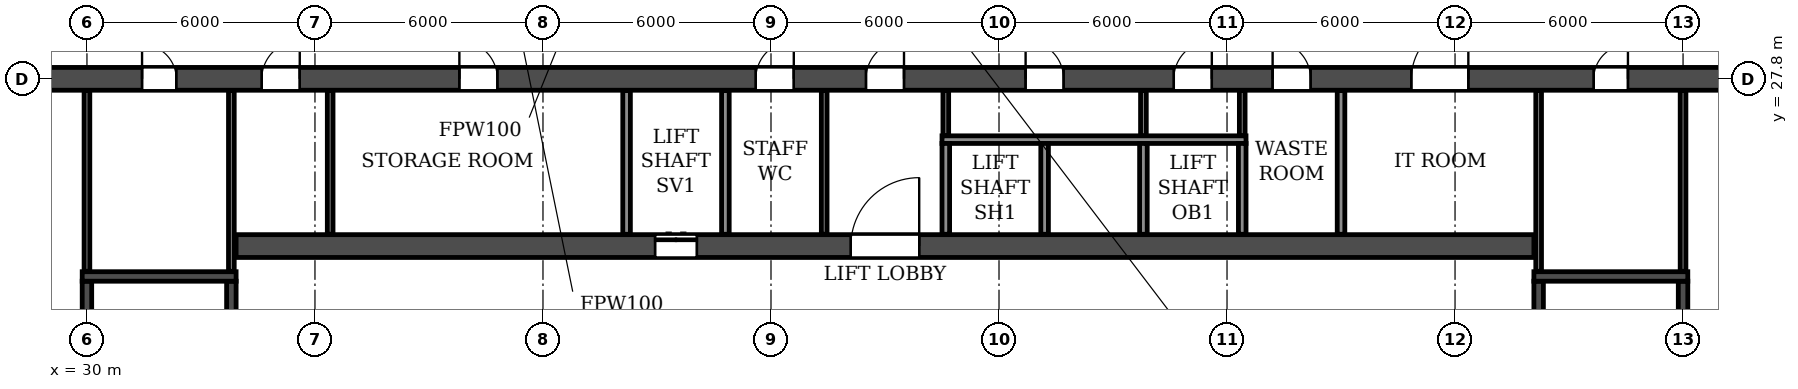
"""IFC4 building model, lengths in metres.
Left out: names, types, materials, properties, quantities, classifications, styles, units other than length and angle.
Written with IfcOpenShell. Run it as: python <this file> out.ifc"""

import sys

from ifc_helpers import new_model, si_unit, direction, frame, frame_2d, origin, place, context, subcontext, project, spatial, rectangle, extrude, element, fill, save


model = new_model("IFC4")
c1 = context("Model", 3, precision=1e-05, world=origin(), true_north=direction((0.0, 1.0)))
c2 = subcontext(c1, "Body", "Model", "MODEL_VIEW")
j1 = project(units=[si_unit("LENGTHUNIT", "METRE"), si_unit("PLANEANGLEUNIT", "RADIAN")], contexts=[c1])
p1 = place(None, origin())
s1 = spatial("IfcSite", under=j1, at=p1, CompositionType="ELEMENT")
p2 = place(p1, origin())
s2 = spatial("IfcBuilding", under=s1, at=p2, CompositionType="ELEMENT")
p3 = place(p2, frame((0.0, 0.0, 26.7)))
s3 = spatial("IfcBuildingStorey", under=s2, at=p3, CompositionType="ELEMENT", Elevation=26.7)
p4 = place(p3, frame((2.6, 27.8, 0.0), z_axis=(0.0, 0.0, 1.0), x_axis=(1.0, 0.0, 0.0)))
e1 = element("IfcWall", 1, at=p4, inside=s3, PredefinedType="SOLIDWALL", context=c2, shape_type="SweptSolid", body=[
    extrude(rectangle(XDim=96.8, YDim=0.6, at=frame_2d((48.4, 0.0))), origin(), (0.0, 0.0, 1.0), 3.05),
])
p5 = place(p4, frame((1.8, 0.0, 0.0)))
e2 = element("IfcOpeningElement", 2, at=p5, cuts=e1, PredefinedType="OPENING", context=c2, shape_type="SweptSolid", body=[
    extrude(rectangle(XDim=1.0, YDim=2.1, at=frame_2d((0.5, 1.05))), frame((0.0, 0.31, 0.0), z_axis=(0.0, -1.0, 0.0), x_axis=(1.0, 0.0, 0.0)), (0.0, 0.0, 1.0), 0.62),
])
p6 = place(p4, frame((9.5, 0.0, 0.0)))
e3 = element("IfcOpeningElement", 3, at=p6, cuts=e1, PredefinedType="OPENING", context=c2, shape_type="SweptSolid", body=[
    extrude(rectangle(XDim=1.0, YDim=2.1, at=frame_2d((0.5, 1.05))), frame((0.0, 0.31, 0.0), z_axis=(0.0, -1.0, 0.0), x_axis=(1.0, 0.0, 0.0)), (0.0, 0.0, 1.0), 0.62),
])
p7 = place(p4, frame((16.3, 0.0, 0.0)))
e4 = element("IfcOpeningElement", 4, at=p7, cuts=e1, PredefinedType="OPENING", context=c2, shape_type="SweptSolid", body=[
    extrude(rectangle(XDim=1.0, YDim=2.1, at=frame_2d((0.5, 1.05))), frame((0.0, 0.31, 0.0), z_axis=(0.0, -1.0, 0.0), x_axis=(1.0, 0.0, 0.0)), (0.0, 0.0, 1.0), 0.62),
])
p8 = place(p4, frame((19.65, 0.0, 0.0)))
e5 = element("IfcOpeningElement", 5, at=p8, cuts=e1, PredefinedType="OPENING", context=c2, shape_type="SweptSolid", body=[
    extrude(rectangle(XDim=0.9, YDim=2.1, at=frame_2d((0.45, 1.05))), frame((0.0, 0.31, 0.0), z_axis=(0.0, -1.0, 0.0), x_axis=(1.0, 0.0, 0.0)), (0.0, 0.0, 1.0), 0.62),
])
p9 = place(p4, frame((28.85, 0.0, 0.0)))
e6 = element("IfcOpeningElement", 6, at=p9, cuts=e1, PredefinedType="OPENING", context=c2, shape_type="SweptSolid", body=[
    extrude(rectangle(XDim=0.9, YDim=2.1, at=frame_2d((0.45, 1.05))), frame((0.0, 0.31, 0.0), z_axis=(0.0, -1.0, 0.0), x_axis=(1.0, 0.0, 0.0)), (0.0, 0.0, 1.0), 0.62),
])
p10 = place(p4, frame((32.0, 0.0, 0.0)))
e7 = element("IfcOpeningElement", 7, at=p10, cuts=e1, PredefinedType="OPENING", context=c2, shape_type="SweptSolid", body=[
    extrude(rectangle(XDim=1.0, YDim=2.1, at=frame_2d((0.5, 1.05))), frame((0.0, 0.31, 0.0), z_axis=(0.0, -1.0, 0.0), x_axis=(1.0, 0.0, 0.0)), (0.0, 0.0, 1.0), 0.62),
])
p11 = place(p4, frame((37.2, 0.0, 0.0)))
e8 = element("IfcOpeningElement", 8, at=p11, cuts=e1, PredefinedType="OPENING", context=c2, shape_type="SweptSolid", body=[
    extrude(rectangle(XDim=1.0, YDim=2.1, at=frame_2d((0.5, 1.05))), frame((0.0, 0.31, 0.0), z_axis=(0.0, -1.0, 0.0), x_axis=(1.0, 0.0, 0.0)), (0.0, 0.0, 1.0), 0.62),
])
p12 = place(p4, frame((45.0, 0.0, 0.0)))
e9 = element("IfcOpeningElement", 9, at=p12, cuts=e1, PredefinedType="OPENING", context=c2, shape_type="SweptSolid", body=[
    extrude(rectangle(XDim=1.0, YDim=2.1, at=frame_2d((0.5, 1.05))), frame((0.0, 0.31, 0.0), z_axis=(0.0, -1.0, 0.0), x_axis=(1.0, 0.0, 0.0)), (0.0, 0.0, 1.0), 0.62),
])
p13 = place(p4, frame((47.9, 0.0, 0.0)))
e10 = element("IfcOpeningElement", 10, at=p13, cuts=e1, PredefinedType="OPENING", context=c2, shape_type="SweptSolid", body=[
    extrude(rectangle(XDim=1.0, YDim=2.1, at=frame_2d((0.5, 1.05))), frame((0.0, 0.31, 0.0), z_axis=(0.0, -1.0, 0.0), x_axis=(1.0, 0.0, 0.0)), (0.0, 0.0, 1.0), 0.62),
])
p14 = place(p4, frame((52.1, 0.0, 0.0)))
e11 = element("IfcOpeningElement", 11, at=p14, cuts=e1, PredefinedType="OPENING", context=c2, shape_type="SweptSolid", body=[
    extrude(rectangle(XDim=1.0, YDim=2.1, at=frame_2d((0.5, 1.05))), frame((0.0, 0.31, 0.0), z_axis=(0.0, -1.0, 0.0), x_axis=(1.0, 0.0, 0.0)), (0.0, 0.0, 1.0), 0.62),
])
p15 = place(p4, frame((56.0, 0.0, 0.0)))
e12 = element("IfcOpeningElement", 12, at=p15, cuts=e1, PredefinedType="OPENING", context=c2, shape_type="SweptSolid", body=[
    extrude(rectangle(XDim=1.0, YDim=2.1, at=frame_2d((0.5, 1.05))), frame((0.0, 0.31, 0.0), z_axis=(0.0, -1.0, 0.0), x_axis=(1.0, 0.0, 0.0)), (0.0, 0.0, 1.0), 0.62),
])
p16 = place(p4, frame((58.6, 0.0, 0.0)))
e13 = element("IfcOpeningElement", 13, at=p16, cuts=e1, PredefinedType="OPENING", context=c2, shape_type="SweptSolid", body=[
    extrude(rectangle(XDim=1.0, YDim=2.1, at=frame_2d((0.5, 1.05))), frame((0.0, 0.31, 0.0), z_axis=(0.0, -1.0, 0.0), x_axis=(1.0, 0.0, 0.0)), (0.0, 0.0, 1.0), 0.62),
])
p17 = place(p4, frame((62.25, 0.0, 0.0)))
e14 = element("IfcOpeningElement", 14, at=p17, cuts=e1, PredefinedType="OPENING", context=c2, shape_type="SweptSolid", body=[
    extrude(rectangle(XDim=1.5, YDim=2.1, at=frame_2d((0.75, 1.05))), frame((0.0, 0.31, 0.0), z_axis=(0.0, -1.0, 0.0), x_axis=(1.0, 0.0, 0.0)), (0.0, 0.0, 1.0), 0.62),
])
p18 = place(p4, frame((67.05, 0.0, 0.0)))
e15 = element("IfcOpeningElement", 15, at=p18, cuts=e1, PredefinedType="OPENING", context=c2, shape_type="SweptSolid", body=[
    extrude(rectangle(XDim=0.9, YDim=2.1, at=frame_2d((0.45, 1.05))), frame((0.0, 0.31, 0.0), z_axis=(0.0, -1.0, 0.0), x_axis=(1.0, 0.0, 0.0)), (0.0, 0.0, 1.0), 0.62),
])
p19 = place(p4, frame((76.25, 0.0, 0.0)))
e16 = element("IfcOpeningElement", 16, at=p19, cuts=e1, PredefinedType="OPENING", context=c2, shape_type="SweptSolid", body=[
    extrude(rectangle(XDim=0.9, YDim=2.1, at=frame_2d((0.45, 1.05))), frame((0.0, 0.31, 0.0), z_axis=(0.0, -1.0, 0.0), x_axis=(1.0, 0.0, 0.0)), (0.0, 0.0, 1.0), 0.62),
])
p20 = place(p4, frame((79.5, 0.0, 0.0)))
e17 = element("IfcOpeningElement", 17, at=p20, cuts=e1, PredefinedType="OPENING", context=c2, shape_type="SweptSolid", body=[
    extrude(rectangle(XDim=1.0, YDim=2.1, at=frame_2d((0.5, 1.05))), frame((0.0, 0.31, 0.0), z_axis=(0.0, -1.0, 0.0), x_axis=(1.0, 0.0, 0.0)), (0.0, 0.0, 1.0), 0.62),
])
p21 = place(p4, frame((88.6, 0.0, 0.0)))
e18 = element("IfcOpeningElement", 18, at=p21, cuts=e1, PredefinedType="OPENING", context=c2, shape_type="SweptSolid", body=[
    extrude(rectangle(XDim=1.0, YDim=2.1, at=frame_2d((0.5, 1.05))), frame((0.0, 0.31, 0.0), z_axis=(0.0, -1.0, 0.0), x_axis=(1.0, 0.0, 0.0)), (0.0, 0.0, 1.0), 0.62),
])
p22 = place(p3, frame((33.925, 23.4, 0.0), z_axis=(0.0, 0.0, 1.0), x_axis=(1.0, 0.0, 0.0)))
e19 = element("IfcWall", 19, at=p22, inside=s3, PredefinedType="SOLIDWALL", context=c2, shape_type="SweptSolid", body=[
    extrude(rectangle(XDim=34.15, YDim=0.6, at=frame_2d((17.075, 0.0))), origin(), (0.0, 0.0, 1.0), 3.05),
])
p23 = place(p22, frame((16.175, 0.0, 0.0)))
e20 = element("IfcOpeningElement", 20, at=p23, cuts=e19, PredefinedType="OPENING", context=c2, shape_type="SweptSolid", body=[
    extrude(rectangle(XDim=1.8, YDim=2.1, at=frame_2d((0.9, 1.05))), frame((0.0, 0.31, 0.0), z_axis=(0.0, -1.0, 0.0), x_axis=(1.0, 0.0, 0.0)), (0.0, 0.0, 1.0), 0.62),
])
p24 = place(p22, frame((11.025, 0.0, 0.0)))
e21 = element("IfcOpeningElement", 21, at=p24, cuts=e19, PredefinedType="OPENING", context=c2, shape_type="SweptSolid", body=[
    extrude(rectangle(XDim=1.1, YDim=2.1, at=frame_2d((0.55, 1.05))), frame((0.0, 0.31, 0.0), z_axis=(0.0, -1.0, 0.0), x_axis=(1.0, 0.0, 0.0)), (0.0, 0.0, 1.0), 0.62),
])
p25 = place(p3, frame((30.0, 14.9, 0.0), z_axis=(0.0, 0.0, 1.0), x_axis=(0.0, 1.0, 0.0)))
e22 = element("IfcWall", 22, at=p25, inside=s3, PredefinedType="SOLIDWALL", context=c2, shape_type="SweptSolid", body=[
    extrude(rectangle(XDim=7.575, YDim=0.25, at=frame_2d((3.788, 0.0))), origin(), (0.0, 0.0, 1.0), 3.05),
])
p26 = place(p3, frame((33.8, 14.9, 0.0), z_axis=(0.0, 0.0, 1.0), x_axis=(0.0, 1.0, 0.0)))
e23 = element("IfcWall", 23, at=p26, inside=s3, PredefinedType="SOLIDWALL", context=c2, shape_type="SweptSolid", body=[
    extrude(rectangle(XDim=7.575, YDim=0.25, at=frame_2d((3.788, 0.0))), origin(), (0.0, 0.0, 1.0), 3.05),
])
p27 = place(p26, frame((0.4, 0.0, 0.0)))
e24 = element("IfcOpeningElement", 24, at=p27, cuts=e23, PredefinedType="OPENING", context=c2, shape_type="SweptSolid", body=[
    extrude(rectangle(XDim=1.0, YDim=2.1, at=frame_2d((0.5, 1.05))), frame((0.0, 0.135, 0.0), z_axis=(0.0, -1.0, 0.0), x_axis=(1.0, 0.0, 0.0)), (0.0, 0.0, 1.0), 0.27),
])
p28 = place(p3, frame((29.875, 22.6, 0.0), z_axis=(0.0, 0.0, 1.0), x_axis=(1.0, 0.0, 0.0)))
e25 = element("IfcWall", 25, at=p28, inside=s3, PredefinedType="SOLIDWALL", context=c2, shape_type="SweptSolid", body=[
    extrude(rectangle(XDim=4.05, YDim=0.25, at=frame_2d((2.025, 0.0))), origin(), (0.0, 0.0, 1.0), 3.05),
])
p29 = place(p3, frame((68.2, 14.9, 0.0), z_axis=(0.0, 0.0, 1.0), x_axis=(0.0, 1.0, 0.0)))
e26 = element("IfcWall", 26, at=p29, inside=s3, PredefinedType="SOLIDWALL", context=c2, shape_type="SweptSolid", body=[
    extrude(rectangle(XDim=7.575, YDim=0.25, at=frame_2d((3.788, 0.0))), origin(), (0.0, 0.0, 1.0), 3.05),
])
p30 = place(p29, frame((0.4, 0.0, 0.0)))
e27 = element("IfcOpeningElement", 27, at=p30, cuts=e26, PredefinedType="OPENING", context=c2, shape_type="SweptSolid", body=[
    extrude(rectangle(XDim=1.0, YDim=2.1, at=frame_2d((0.5, 1.05))), frame((0.0, 0.135, 0.0), z_axis=(0.0, -1.0, 0.0), x_axis=(1.0, 0.0, 0.0)), (0.0, 0.0, 1.0), 0.27),
])
p31 = place(p3, frame((72.0, 14.9, 0.0), z_axis=(0.0, 0.0, 1.0), x_axis=(0.0, 1.0, 0.0)))
e28 = element("IfcWall", 28, at=p31, inside=s3, PredefinedType="SOLIDWALL", context=c2, shape_type="SweptSolid", body=[
    extrude(rectangle(XDim=7.575, YDim=0.25, at=frame_2d((3.788, 0.0))), origin(), (0.0, 0.0, 1.0), 3.05),
])
p32 = place(p3, frame((68.075, 22.6, 0.0), z_axis=(0.0, 0.0, 1.0), x_axis=(1.0, 0.0, 0.0)))
e29 = element("IfcWall", 29, at=p32, inside=s3, PredefinedType="SOLIDWALL", context=c2, shape_type="SweptSolid", body=[
    extrude(rectangle(XDim=4.05, YDim=0.25, at=frame_2d((2.025, 0.0))), origin(), (0.0, 0.0, 1.0), 3.05),
])
p33 = place(p3, frame((49.4, 23.71, 0.0), z_axis=(0.0, 0.0, 1.0), x_axis=(0.0, 1.0, 0.0)))
e30 = element("IfcWall", 30, at=p33, inside=s3, PredefinedType="PARTITIONING", context=c2, shape_type="SweptSolid", body=[
    extrude(rectangle(XDim=3.78, YDim=0.15, at=frame_2d((1.89, 0.0))), origin(), (0.0, 0.0, 1.0), 3.05),
])
p34 = place(p3, frame((52.6, 26.3, 0.0), z_axis=(0.0, 0.0, 1.0), x_axis=(0.0, 1.0, 0.0)))
e31 = element("IfcWall", 31, at=p34, inside=s3, PredefinedType="PARTITIONING", context=c2, shape_type="SweptSolid", body=[
    extrude(rectangle(XDim=1.19, YDim=0.15, at=frame_2d((0.595, 0.0))), origin(), (0.0, 0.0, 1.0), 3.05),
])
p35 = place(p3, frame((36.4, 23.71, 0.0), z_axis=(0.0, 0.0, 1.0), x_axis=(0.0, 1.0, 0.0)))
e32 = element("IfcWall", 32, at=p35, inside=s3, PredefinedType="PARTITIONING", context=c2, shape_type="SweptSolid", body=[
    extrude(rectangle(XDim=3.78, YDim=0.15, at=frame_2d((1.89, 0.0))), origin(), (0.0, 0.0, 1.0), 3.05),
])
for number, where, z_axis, x_axis in (
    (33, (57.8, 26.3, 0.0), (0.0, 0.0, 1.0), (0.0, 1.0, 0.0)),
    (34, (60.4, 26.3, 0.0), (0.0, 0.0, 1.0), (0.0, 1.0, 0.0)),
):
    element("IfcWall", number, at=place(p3, frame(where, z_axis=z_axis, x_axis=x_axis)), inside=s3, PredefinedType="PARTITIONING", context=c2, shape_type="SweptSolid", body=[
        extrude(rectangle(XDim=1.19, YDim=0.15, at=frame_2d((0.595, 0.0))), origin(), (0.0, 0.0, 1.0), 3.05),
    ])
p36 = place(p3, frame((63.0, 23.71, 0.0), z_axis=(0.0, 0.0, 1.0), x_axis=(0.0, 1.0, 0.0)))
e35 = element("IfcWall", 35, at=p36, inside=s3, PredefinedType="PARTITIONING", context=c2, shape_type="SweptSolid", body=[
    extrude(rectangle(XDim=3.78, YDim=0.2, at=frame_2d((1.89, 0.0))), origin(), (0.0, 0.0, 1.0), 3.05),
])
for number, where, z_axis, x_axis in (
    (36, (30.0, 22.735, 0.0), (0.0, 0.0, 1.0), (0.0, 1.0, 0.0)),
    (37, (33.8, 22.735, 0.0), (0.0, 0.0, 1.0), (0.0, 1.0, 0.0)),
    (38, (68.2, 22.735, 0.0), (0.0, 0.0, 1.0), (0.0, 1.0, 0.0)),
    (39, (72.0, 22.735, 0.0), (0.0, 0.0, 1.0), (0.0, 1.0, 0.0)),
):
    element("IfcWall", number, at=place(p3, frame(where, z_axis=z_axis, x_axis=x_axis)), inside=s3, PredefinedType="PARTITIONING", context=c2, shape_type="SweptSolid", body=[
        extrude(rectangle(XDim=4.755, YDim=0.15, at=frame_2d((2.377, 0.0))), origin(), (0.0, 0.0, 1.0), 3.05),
    ])
p37 = place(p3, frame((52.5, 26.2, 0.0), z_axis=(0.0, 0.0, 1.0), x_axis=(1.0, 0.0, 0.0)))
e40 = element("IfcWall", 40, at=p37, inside=s3, PredefinedType="PARTITIONING", context=c2, shape_type="SweptSolid", body=[
    extrude(rectangle(XDim=8.0, YDim=0.2, at=frame_2d((4.0, 0.0))), origin(), (0.0, 0.0, 1.0), 3.05),
])
for number, where, z_axis, x_axis in (
    (41, (44.2, 23.71, 0.0), (0.0, 0.0, 1.0), (0.0, 1.0, 0.0)),
    (42, (46.8, 23.71, 0.0), (0.0, 0.0, 1.0), (0.0, 1.0, 0.0)),
):
    element("IfcWall", number, at=place(p3, frame(where, z_axis=z_axis, x_axis=x_axis)), inside=s3, PredefinedType="PARTITIONING", context=c2, shape_type="SweptSolid", body=[
        extrude(rectangle(XDim=3.78, YDim=0.2, at=frame_2d((1.89, 0.0))), origin(), (0.0, 0.0, 1.0), 3.05),
    ])
for number, where, z_axis, x_axis in (
    (43, (52.6, 23.71, 0.0), (0.0, 0.0, 1.0), (0.0, 1.0, 0.0)),
    (44, (55.2, 23.71, 0.0), (0.0, 0.0, 1.0), (0.0, 1.0, 0.0)),
    (45, (57.8, 23.71, 0.0), (0.0, 0.0, 1.0), (0.0, 1.0, 0.0)),
    (46, (60.4, 23.71, 0.0), (0.0, 0.0, 1.0), (0.0, 1.0, 0.0)),
):
    element("IfcWall", number, at=place(p3, frame(where, z_axis=z_axis, x_axis=x_axis)), inside=s3, PredefinedType="PARTITIONING", context=c2, shape_type="SweptSolid", body=[
        extrude(rectangle(XDim=2.39, YDim=0.2, at=frame_2d((1.195, 0.0))), origin(), (0.0, 0.0, 1.0), 3.05),
    ])
p38 = place(p9, origin())
e47 = element("IfcDoor", 47, at=p38, inside=s3, OperationType="SINGLE_SWING_LEFT", PredefinedType="DOOR", context=c2, shape_type="SweptSolid", body=[
    extrude(rectangle(XDim=0.9, YDim=2.1, at=frame_2d((0.45, 1.05))), frame((0.0, 0.025, 0.0), z_axis=(0.0, -1.0, 0.0), x_axis=(1.0, 0.0, 0.0)), (0.0, 0.0, 1.0), 0.05),
])
fill(e6, e47)
p39 = place(p10, origin())
e48 = element("IfcDoor", 48, at=p39, inside=s3, OperationType="SINGLE_SWING_RIGHT", PredefinedType="DOOR", context=c2, shape_type="SweptSolid", body=[
    extrude(rectangle(XDim=1.0, YDim=2.1, at=frame_2d((0.5, 1.05))), frame((0.0, 0.025, 0.0), z_axis=(0.0, -1.0, 0.0), x_axis=(1.0, 0.0, 0.0)), (0.0, 0.0, 1.0), 0.05),
])
fill(e7, e48)
p40 = place(p11, origin())
e49 = element("IfcDoor", 49, at=p40, inside=s3, OperationType="SINGLE_SWING_LEFT", PredefinedType="DOOR", context=c2, shape_type="SweptSolid", body=[
    extrude(rectangle(XDim=1.0, YDim=2.1, at=frame_2d((0.5, 1.05))), frame((0.0, 0.025, 0.0), z_axis=(0.0, -1.0, 0.0), x_axis=(1.0, 0.0, 0.0)), (0.0, 0.0, 1.0), 0.05),
])
fill(e8, e49)
p41 = place(p12, origin())
e50 = element("IfcDoor", 50, at=p41, inside=s3, OperationType="SINGLE_SWING_RIGHT", PredefinedType="DOOR", context=c2, shape_type="SweptSolid", body=[
    extrude(rectangle(XDim=1.0, YDim=2.1, at=frame_2d((0.5, 1.05))), frame((0.0, 0.025, 0.0), z_axis=(0.0, -1.0, 0.0), x_axis=(1.0, 0.0, 0.0)), (0.0, 0.0, 1.0), 0.05),
])
fill(e9, e50)
p42 = place(p13, origin())
e51 = element("IfcDoor", 51, at=p42, inside=s3, OperationType="SINGLE_SWING_RIGHT", PredefinedType="DOOR", context=c2, shape_type="SweptSolid", body=[
    extrude(rectangle(XDim=1.0, YDim=2.1, at=frame_2d((0.5, 1.05))), frame((0.0, 0.025, 0.0), z_axis=(0.0, -1.0, 0.0), x_axis=(1.0, 0.0, 0.0)), (0.0, 0.0, 1.0), 0.05),
])
fill(e10, e51)
p43 = place(p14, origin())
e52 = element("IfcDoor", 52, at=p43, inside=s3, OperationType="SINGLE_SWING_LEFT", PredefinedType="DOOR", context=c2, shape_type="SweptSolid", body=[
    extrude(rectangle(XDim=1.0, YDim=2.1, at=frame_2d((0.5, 1.05))), frame((0.0, 0.025, 0.0), z_axis=(0.0, -1.0, 0.0), x_axis=(1.0, 0.0, 0.0)), (0.0, 0.0, 1.0), 0.05),
])
fill(e11, e52)
p44 = place(p15, origin())
e53 = element("IfcDoor", 53, at=p44, inside=s3, OperationType="SINGLE_SWING_RIGHT", PredefinedType="DOOR", context=c2, shape_type="SweptSolid", body=[
    extrude(rectangle(XDim=1.0, YDim=2.1, at=frame_2d((0.5, 1.05))), frame((0.0, 0.025, 0.0), z_axis=(0.0, -1.0, 0.0), x_axis=(1.0, 0.0, 0.0)), (0.0, 0.0, 1.0), 0.05),
])
fill(e12, e53)
p45 = place(p16, origin())
e54 = element("IfcDoor", 54, at=p45, inside=s3, OperationType="SINGLE_SWING_LEFT", PredefinedType="DOOR", context=c2, shape_type="SweptSolid", body=[
    extrude(rectangle(XDim=1.0, YDim=2.1, at=frame_2d((0.5, 1.05))), frame((0.0, 0.025, 0.0), z_axis=(0.0, -1.0, 0.0), x_axis=(1.0, 0.0, 0.0)), (0.0, 0.0, 1.0), 0.05),
])
fill(e13, e54)
p46 = place(p17, origin())
e55 = element("IfcDoor", 55, at=p46, inside=s3, OperationType="DOUBLE_DOOR_SINGLE_SWING", PredefinedType="DOOR", context=c2, shape_type="SweptSolid", body=[
    extrude(rectangle(XDim=1.5, YDim=2.1, at=frame_2d((0.75, 1.05))), frame((0.0, 0.025, 0.0), z_axis=(0.0, -1.0, 0.0), x_axis=(1.0, 0.0, 0.0)), (0.0, 0.0, 1.0), 0.05),
])
fill(e14, e55)
p47 = place(p18, origin())
e56 = element("IfcDoor", 56, at=p47, inside=s3, OperationType="SINGLE_SWING_RIGHT", PredefinedType="DOOR", context=c2, shape_type="SweptSolid", body=[
    extrude(rectangle(XDim=0.9, YDim=2.1, at=frame_2d((0.45, 1.05))), frame((0.0, 0.025, 0.0), z_axis=(0.0, -1.0, 0.0), x_axis=(1.0, 0.0, 0.0)), (0.0, 0.0, 1.0), 0.05),
])
fill(e15, e56)
p48 = place(p23, origin())
e57 = element("IfcDoor", 57, at=p48, inside=s3, OperationType="DOUBLE_DOOR_SINGLE_SWING", PredefinedType="DOOR", context=c2, shape_type="SweptSolid", body=[
    extrude(rectangle(XDim=1.8, YDim=2.1, at=frame_2d((0.9, 1.05))), frame((0.0, 0.025, 0.0), z_axis=(0.0, -1.0, 0.0), x_axis=(1.0, 0.0, 0.0)), (0.0, 0.0, 1.0), 0.05),
])
fill(e20, e57)
p49 = place(p24, origin())
e58 = element("IfcDoor", 58, at=p49, inside=s3, OperationType="DOUBLE_DOOR_SLIDING", PredefinedType="DOOR", context=c2, shape_type="SweptSolid", body=[
    extrude(rectangle(XDim=1.1, YDim=2.1, at=frame_2d((0.55, 1.05))), frame((0.0, 0.025, 0.0), z_axis=(0.0, -1.0, 0.0), x_axis=(1.0, 0.0, 0.0)), (0.0, 0.0, 1.0), 0.05),
])
fill(e21, e58)
save(model, sys.argv[1])
